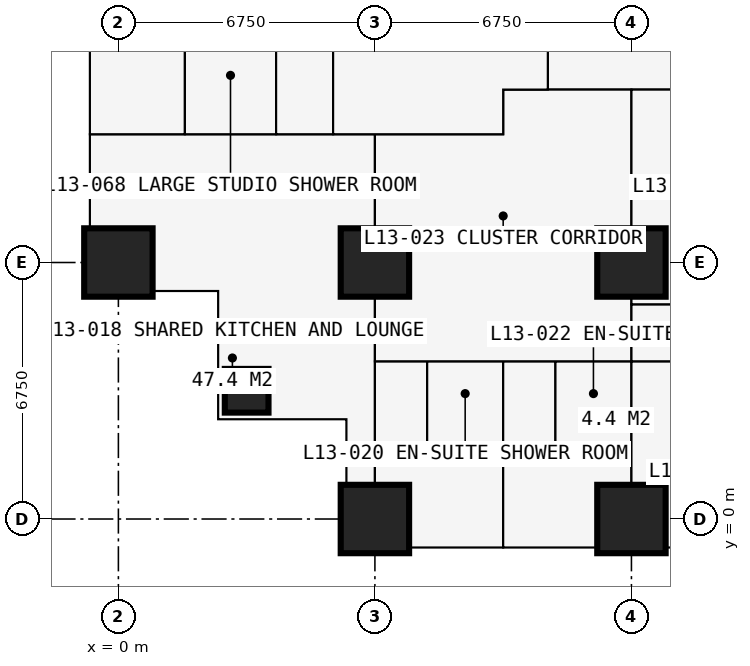
"""IFC4 building model, lengths in metres.
Left out: names, types, materials, properties, quantities, classifications, styles, units other than length and angle.
Written with IfcOpenShell. Run it as: python <this file> out.ifc"""

import sys

from ifc_helpers import new_model, si_unit, direction, frame, frame_2d, origin, origin_2d, place, context, subcontext, project, spatial, rectangle, extrude, element, fill, save


model = new_model("IFC4")
c1 = context("Model", 3, precision=1e-05, world=origin(), true_north=direction((0.0, 1.0)))
c2 = subcontext(c1, "Body", "Model", "MODEL_VIEW")
j1 = project(units=[si_unit("LENGTHUNIT", "METRE"), si_unit("PLANEANGLEUNIT", "RADIAN")], contexts=[c1])
p1 = place(None, origin())
s1 = spatial("IfcSite", under=j1, at=p1, CompositionType="ELEMENT")
p2 = place(p1, origin())
s2 = spatial("IfcBuilding", under=s1, at=p2, CompositionType="ELEMENT")
p3 = place(p2, frame((0.0, 0.0, 50.4)))
s3 = spatial("IfcBuildingStorey", under=s2, at=p3, CompositionType="ELEMENT", Elevation=50.4)
p4 = place(p3, frame((0.0, 6.75, 0.0), z_axis=(0.0, 0.0, 1.0), x_axis=(1.0, 0.0, 0.0)))
e1 = element("IfcColumn", 1, at=p4, inside=s3, PredefinedType="COLUMN", context=c2, shape_type="SweptSolid", body=[
    extrude(rectangle(XDim=1.8, YDim=1.8, at=origin_2d()), origin(), (0.0, 0.0, 1.0), 3.6),
])
p5 = place(p3, frame((3.375, 3.375, 0.0), z_axis=(0.0, 0.0, 1.0), x_axis=(1.0, 0.0, 0.0)))
e2 = element("IfcColumn", 2, at=p5, inside=s3, PredefinedType="COLUMN", context=c2, shape_type="SweptSolid", body=[
    extrude(rectangle(XDim=1.15, YDim=1.15, at=origin_2d()), origin(), (0.0, 0.0, 1.0), 3.6),
])
for number, where, z_axis, x_axis in (
    (3, (6.75, 0.0, 0.0), (0.0, 0.0, 1.0), (1.0, 0.0, 0.0)),
    (4, (6.75, 6.75, 0.0), (0.0, 0.0, 1.0), (1.0, 0.0, 0.0)),
    (5, (13.5, 0.0, 0.0), (0.0, 0.0, 1.0), (1.0, 0.0, 0.0)),
    (6, (13.5, 6.75, 0.0), (0.0, 0.0, 1.0), (1.0, 0.0, 0.0)),
):
    element("IfcColumn", number, at=place(p3, frame(where, z_axis=z_axis, x_axis=x_axis)), inside=s3, PredefinedType="COLUMN", context=c2, shape_type="SweptSolid", body=[
        extrude(rectangle(XDim=1.8, YDim=1.8, at=origin_2d()), origin(), (0.0, 0.0, 1.0), 3.6),
    ])
p6 = place(p3, frame((-0.75, 6.0, 0.0), z_axis=(0.0, 0.0, 1.0), x_axis=(1.0, 0.0, 0.0)))
e7 = element("IfcWall", 7, at=p6, inside=s3, PredefinedType="SOLIDWALL", context=c2, shape_type="SweptSolid", body=[
    extrude(rectangle(XDim=3.375, YDim=0.3, at=frame_2d((1.688, 0.0))), origin(), (0.0, 0.0, 1.0), 3.375),
])
p7 = place(p6, frame((1.833, 0.0, 0.9)))
e8 = element("IfcOpeningElement", 8, at=p7, cuts=e7, PredefinedType="OPENING", context=c2, shape_type="SweptSolid", body=[
    extrude(rectangle(XDim=1.2, YDim=1.8, at=frame_2d((0.6, 0.9))), frame((0.0, 0.16, 0.0), z_axis=(0.0, -1.0, 0.0), x_axis=(1.0, 0.0, 0.0)), (0.0, 0.0, 1.0), 0.32),
])
p8 = place(p3, frame((2.625, 6.0, 0.0), z_axis=(0.0, 0.0, 1.0), x_axis=(0.0, -1.0, 0.0)))
e9 = element("IfcWall", 9, at=p8, inside=s3, PredefinedType="SOLIDWALL", context=c2, shape_type="SweptSolid", body=[
    extrude(rectangle(XDim=3.375, YDim=0.3, at=frame_2d((1.688, 0.0))), origin(), (0.0, 0.0, 1.0), 3.375),
])
p9 = place(p8, frame((0.788, 0.0, 0.6)))
e10 = element("IfcOpeningElement", 10, at=p9, cuts=e9, PredefinedType="OPENING", context=c2, shape_type="SweptSolid", body=[
    extrude(rectangle(XDim=1.8, YDim=2.1, at=frame_2d((0.9, 1.05))), frame((0.0, 0.16, 0.0), z_axis=(0.0, -1.0, 0.0), x_axis=(1.0, 0.0, 0.0)), (0.0, 0.0, 1.0), 0.32),
])
p10 = place(p3, frame((2.625, 2.625, 0.0), z_axis=(0.0, 0.0, 1.0), x_axis=(1.0, 0.0, 0.0)))
e11 = element("IfcWall", 11, at=p10, inside=s3, PredefinedType="SOLIDWALL", context=c2, shape_type="SweptSolid", body=[
    extrude(rectangle(XDim=3.375, YDim=0.3, at=frame_2d((1.688, 0.0))), origin(), (0.0, 0.0, 1.0), 3.375),
])
p11 = place(p10, frame((0.788, 0.0, 0.6)))
e12 = element("IfcOpeningElement", 12, at=p11, cuts=e11, PredefinedType="OPENING", context=c2, shape_type="SweptSolid", body=[
    extrude(rectangle(XDim=1.8, YDim=2.1, at=frame_2d((0.9, 1.05))), frame((0.0, 0.16, 0.0), z_axis=(0.0, -1.0, 0.0), x_axis=(1.0, 0.0, 0.0)), (0.0, 0.0, 1.0), 0.32),
])
p12 = place(p3, frame((6.0, 2.625, 0.0), z_axis=(0.0, 0.0, 1.0), x_axis=(0.0, -1.0, 0.0)))
e13 = element("IfcWall", 13, at=p12, inside=s3, PredefinedType="SOLIDWALL", context=c2, shape_type="SweptSolid", body=[
    extrude(rectangle(XDim=3.375, YDim=0.3, at=frame_2d((1.688, 0.0))), origin(), (0.0, 0.0, 1.0), 3.375),
])
p13 = place(p12, frame((0.343, 0.0, 0.9)))
e14 = element("IfcOpeningElement", 14, at=p13, cuts=e13, PredefinedType="OPENING", context=c2, shape_type="SweptSolid", body=[
    extrude(rectangle(XDim=1.2, YDim=1.8, at=frame_2d((0.6, 0.9))), frame((0.0, 0.16, 0.0), z_axis=(0.0, -1.0, 0.0), x_axis=(1.0, 0.0, 0.0)), (0.0, 0.0, 1.0), 0.32),
])
p14 = place(p3, frame((-0.734, 10.125, 0.0), z_axis=(0.0, 0.0, 1.0), x_axis=(1.0, 0.0, 0.0)))
e15 = element("IfcWall", 15, at=p14, inside=s3, PredefinedType="PARTITIONING", context=c2, shape_type="SweptSolid", body=[
    extrude(rectangle(XDim=10.859, YDim=0.15, at=frame_2d((5.429, 0.0))), origin(), (0.0, 0.0, 1.0), 3.375),
])
p15 = place(p14, frame((5.134, 0.0, 0.0)))
e16 = element("IfcOpeningElement", 16, at=p15, cuts=e15, PredefinedType="OPENING", context=c2, shape_type="SweptSolid", body=[
    extrude(rectangle(XDim=1.0, YDim=2.2, at=frame_2d((0.5, 1.1))), frame((0.0, 0.085, 0.0), z_axis=(0.0, -1.0, 0.0), x_axis=(1.0, 0.0, 0.0)), (0.0, 0.0, 1.0), 0.17),
])
p16 = place(p3, frame((1.75, 10.125, 0.0), z_axis=(0.0, 0.0, 1.0), x_axis=(0.0, 1.0, 0.0)))
e17 = element("IfcWall", 17, at=p16, inside=s3, PredefinedType="PARTITIONING", context=c2, shape_type="SweptSolid", body=[
    extrude(rectangle(XDim=2.6, YDim=0.1, at=frame_2d((1.3, 0.0))), origin(), (0.0, 0.0, 1.0), 3.375),
])
p17 = place(p16, frame((0.85, 0.0, 0.0)))
e18 = element("IfcOpeningElement", 18, at=p17, cuts=e17, PredefinedType="OPENING", context=c2, shape_type="SweptSolid", body=[
    extrude(rectangle(XDim=0.9, YDim=2.2, at=frame_2d((0.45, 1.1))), frame((0.0, 0.06, 0.0), z_axis=(0.0, -1.0, 0.0), x_axis=(1.0, 0.0, 0.0)), (0.0, 0.0, 1.0), 0.12),
])
p18 = place(p3, frame((4.15, 10.125, 0.0), z_axis=(0.0, 0.0, 1.0), x_axis=(0.0, 1.0, 0.0)))
e19 = element("IfcWall", 19, at=p18, inside=s3, PredefinedType="PARTITIONING", context=c2, shape_type="SweptSolid", body=[
    extrude(rectangle(XDim=23.625, YDim=0.15, at=frame_2d((11.812, 0.0))), origin(), (0.0, 0.0, 1.0), 3.375),
])
p19 = place(p18, frame((4.2, 0.0, 0.0)))
e20 = element("IfcOpeningElement", 20, at=p19, cuts=e19, PredefinedType="OPENING", context=c2, shape_type="SweptSolid", body=[
    extrude(rectangle(XDim=0.95, YDim=2.2, at=frame_2d((0.475, 1.1))), frame((0.0, 0.085, 0.0), z_axis=(0.0, -1.0, 0.0), x_axis=(1.0, 0.0, 0.0)), (0.0, 0.0, 1.0), 0.17),
])
p20 = place(p18, frame((10.95, 0.0, 0.0)))
e21 = element("IfcOpeningElement", 21, at=p20, cuts=e19, PredefinedType="OPENING", context=c2, shape_type="SweptSolid", body=[
    extrude(rectangle(XDim=0.95, YDim=2.2, at=frame_2d((0.475, 1.1))), frame((0.0, 0.085, 0.0), z_axis=(0.0, -1.0, 0.0), x_axis=(1.0, 0.0, 0.0)), (0.0, 0.0, 1.0), 0.17),
])
p21 = place(p18, frame((17.7, 0.0, 0.0)))
e22 = element("IfcOpeningElement", 22, at=p21, cuts=e19, PredefinedType="OPENING", context=c2, shape_type="SweptSolid", body=[
    extrude(rectangle(XDim=0.95, YDim=2.2, at=frame_2d((0.475, 1.1))), frame((0.0, 0.085, 0.0), z_axis=(0.0, -1.0, 0.0), x_axis=(1.0, 0.0, 0.0)), (0.0, 0.0, 1.0), 0.17),
])
p22 = place(p18, frame((20.5, 0.0, 0.0)))
e23 = element("IfcOpeningElement", 23, at=p22, cuts=e19, PredefinedType="OPENING", context=c2, shape_type="SweptSolid", body=[
    extrude(rectangle(XDim=0.95, YDim=2.2, at=frame_2d((0.475, 1.1))), frame((0.0, 0.085, 0.0), z_axis=(0.0, -1.0, 0.0), x_axis=(1.0, 0.0, 0.0)), (0.0, 0.0, 1.0), 0.17),
])
p23 = place(p3, frame((5.65, 10.125, 0.0), z_axis=(0.0, 0.0, 1.0), x_axis=(0.0, 1.0, 0.0)))
e24 = element("IfcWall", 24, at=p23, inside=s3, PredefinedType="PARTITIONING", context=c2, shape_type="SweptSolid", body=[
    extrude(rectangle(XDim=10.762, YDim=0.15, at=frame_2d((5.381, 0.0))), origin(), (0.0, 0.0, 1.0), 3.375),
])
p24 = place(p23, frame((4.9, 0.0, 0.0)))
e25 = element("IfcOpeningElement", 25, at=p24, cuts=e24, PredefinedType="OPENING", context=c2, shape_type="SweptSolid", body=[
    extrude(rectangle(XDim=0.95, YDim=2.2, at=frame_2d((0.475, 1.1))), frame((0.0, 0.085, 0.0), z_axis=(0.0, -1.0, 0.0), x_axis=(1.0, 0.0, 0.0)), (0.0, 0.0, 1.0), 0.17),
])
p25 = place(p3, frame((6.75, -0.734, 0.0), z_axis=(0.0, 0.0, 1.0), x_axis=(0.0, 1.0, 0.0)))
e26 = element("IfcWall", 26, at=p25, inside=s3, PredefinedType="PARTITIONING", context=c2, shape_type="SweptSolid", body=[
    extrude(rectangle(XDim=10.859, YDim=0.15, at=frame_2d((5.429, 0.0))), origin(), (0.0, 0.0, 1.0), 2.877),
])
p26 = place(p3, frame((6.75, 4.15, 0.0), z_axis=(0.0, 0.0, 1.0), x_axis=(1.0, 0.0, 0.0)))
e27 = element("IfcWall", 27, at=p26, inside=s3, PredefinedType="PARTITIONING", context=c2, shape_type="SweptSolid", body=[
    extrude(rectangle(XDim=23.625, YDim=0.15, at=frame_2d((11.812, 0.0))), origin(), (0.0, 0.0, 1.0), 3.375),
])
p27 = place(p26, frame((0.2, 0.0, 0.0)))
e28 = element("IfcOpeningElement", 28, at=p27, cuts=e27, PredefinedType="OPENING", context=c2, shape_type="SweptSolid", body=[
    extrude(rectangle(XDim=0.95, YDim=2.2, at=frame_2d((0.475, 1.1))), frame((0.0, 0.085, 0.0), z_axis=(0.0, -1.0, 0.0), x_axis=(1.0, 0.0, 0.0)), (0.0, 0.0, 1.0), 0.17),
])
p28 = place(p26, frame((3.625, 0.0, 0.0)))
e29 = element("IfcOpeningElement", 29, at=p28, cuts=e27, PredefinedType="OPENING", context=c2, shape_type="SweptSolid", body=[
    extrude(rectangle(XDim=0.95, YDim=2.2, at=frame_2d((0.475, 1.1))), frame((0.0, 0.085, 0.0), z_axis=(0.0, -1.0, 0.0), x_axis=(1.0, 0.0, 0.0)), (0.0, 0.0, 1.0), 0.17),
])
p29 = place(p26, frame((18.475, 0.0, 0.0)))
e30 = element("IfcOpeningElement", 30, at=p29, cuts=e27, PredefinedType="OPENING", context=c2, shape_type="SweptSolid", body=[
    extrude(rectangle(XDim=0.95, YDim=2.2, at=frame_2d((0.475, 1.1))), frame((0.0, 0.085, 0.0), z_axis=(0.0, -1.0, 0.0), x_axis=(1.0, 0.0, 0.0)), (0.0, 0.0, 1.0), 0.17),
])
p30 = place(p26, frame((11.725, 0.0, 0.0)))
e31 = element("IfcOpeningElement", 31, at=p30, cuts=e27, PredefinedType="OPENING", context=c2, shape_type="SweptSolid", body=[
    extrude(rectangle(XDim=0.95, YDim=2.2, at=frame_2d((0.475, 1.1))), frame((0.0, 0.085, 0.0), z_axis=(0.0, -1.0, 0.0), x_axis=(1.0, 0.0, 0.0)), (0.0, 0.0, 1.0), 0.17),
])
p31 = place(p26, frame((6.95, 0.0, 0.0)))
e32 = element("IfcOpeningElement", 32, at=p31, cuts=e27, PredefinedType="OPENING", context=c2, shape_type="SweptSolid", body=[
    extrude(rectangle(XDim=0.95, YDim=2.2, at=frame_2d((0.475, 1.1))), frame((0.0, 0.085, 0.0), z_axis=(0.0, -1.0, 0.0), x_axis=(1.0, 0.0, 0.0)), (0.0, 0.0, 1.0), 0.17),
])
p32 = place(p3, frame((8.125, 1.95, 0.0), z_axis=(0.0, 0.0, 1.0), x_axis=(0.0, 1.0, 0.0)))
e33 = element("IfcWall", 33, at=p32, inside=s3, PredefinedType="PARTITIONING", context=c2, shape_type="SweptSolid", body=[
    extrude(rectangle(XDim=2.2, YDim=0.1, at=frame_2d((1.1, 0.0))), origin(), (0.0, 0.0, 1.0), 3.375),
])
p33 = place(p32, frame((0.65, 0.0, 0.0)))
e34 = element("IfcOpeningElement", 34, at=p33, cuts=e33, PredefinedType="OPENING", context=c2, shape_type="SweptSolid", body=[
    extrude(rectangle(XDim=0.9, YDim=2.2, at=frame_2d((0.45, 1.1))), frame((0.0, 0.06, 0.0), z_axis=(0.0, -1.0, 0.0), x_axis=(1.0, 0.0, 0.0)), (0.0, 0.0, 1.0), 0.12),
])
p34 = place(p3, frame((8.125, 1.95, 0.0), z_axis=(0.0, 0.0, 1.0), x_axis=(1.0, 0.0, 0.0)))
e35 = element("IfcWall", 35, at=p34, inside=s3, PredefinedType="PARTITIONING", context=c2, shape_type="SweptSolid", body=[
    extrude(rectangle(XDim=2.0, YDim=0.1, at=frame_2d((1.0, 0.0))), origin(), (0.0, 0.0, 1.0), 3.375),
])
p35 = place(p3, frame((10.125, -0.734, 0.0), z_axis=(0.0, 0.0, 1.0), x_axis=(0.0, 1.0, 0.0)))
e36 = element("IfcWall", 36, at=p35, inside=s3, PredefinedType="PARTITIONING", context=c2, shape_type="SweptSolid", body=[
    extrude(rectangle(XDim=4.884, YDim=0.175, at=frame_2d((2.442, 0.0))), origin(), (0.0, 0.0, 1.0), 3.375),
])
p36 = place(p3, frame((10.125, 10.125, 0.0), z_axis=(0.0, 0.0, 1.0), x_axis=(0.0, 1.0, 0.0)))
e37 = element("IfcWall", 37, at=p36, inside=s3, PredefinedType="PARTITIONING", context=c2, shape_type="SweptSolid", body=[
    extrude(rectangle(XDim=1.175, YDim=0.15, at=frame_2d((0.587, 0.0))), origin(), (0.0, 0.0, 1.0), 3.375),
])
p37 = place(p3, frame((10.125, 11.3, 0.0), z_axis=(0.0, 0.0, 1.0), x_axis=(1.0, 0.0, 0.0)))
e38 = element("IfcWall", 38, at=p37, inside=s3, PredefinedType="PARTITIONING", context=c2, shape_type="SweptSolid", body=[
    extrude(rectangle(XDim=20.675, YDim=0.15, at=frame_2d((10.337, 0.0))), origin(), (0.0, 0.0, 1.0), 3.375),
])
p38 = place(p37, frame((1.775, 0.0, 0.0)))
e39 = element("IfcOpeningElement", 39, at=p38, cuts=e38, PredefinedType="OPENING", context=c2, shape_type="SweptSolid", body=[
    extrude(rectangle(XDim=1.0, YDim=2.2, at=frame_2d((0.5, 1.1))), frame((0.0, 0.085, 0.0), z_axis=(0.0, -1.0, 0.0), x_axis=(1.0, 0.0, 0.0)), (0.0, 0.0, 1.0), 0.17),
])
p39 = place(p37, frame((11.312, 0.0, 0.0)))
e40 = element("IfcOpeningElement", 40, at=p39, cuts=e38, PredefinedType="OPENING", context=c2, shape_type="SweptSolid", body=[
    extrude(rectangle(XDim=1.0, YDim=2.2, at=frame_2d((0.5, 1.1))), frame((0.0, 0.085, 0.0), z_axis=(0.0, -1.0, 0.0), x_axis=(1.0, 0.0, 0.0)), (0.0, 0.0, 1.0), 0.17),
])
p40 = place(p3, frame((11.3, 11.3, 0.0), z_axis=(0.0, 0.0, 1.0), x_axis=(0.0, 1.0, 0.0)))
e41 = element("IfcWall", 41, at=p40, inside=s3, PredefinedType="PARTITIONING", context=c2, shape_type="SweptSolid", body=[
    extrude(rectangle(XDim=19.075, YDim=0.15, at=frame_2d((9.538, 0.0))), origin(), (0.0, 0.0, 1.0), 3.375),
])
p41 = place(p40, frame((10.137, 0.0, 0.0)))
e42 = element("IfcOpeningElement", 42, at=p41, cuts=e41, PredefinedType="OPENING", context=c2, shape_type="SweptSolid", body=[
    extrude(rectangle(XDim=1.0, YDim=2.2, at=frame_2d((0.5, 1.1))), frame((0.0, 0.085, 0.0), z_axis=(0.0, -1.0, 0.0), x_axis=(1.0, 0.0, 0.0)), (0.0, 0.0, 1.0), 0.17),
])
p42 = place(p3, frame((11.5, 1.95, 0.0), z_axis=(0.0, 0.0, 1.0), x_axis=(0.0, 1.0, 0.0)))
e43 = element("IfcWall", 43, at=p42, inside=s3, PredefinedType="PARTITIONING", context=c2, shape_type="SweptSolid", body=[
    extrude(rectangle(XDim=2.2, YDim=0.1, at=frame_2d((1.1, 0.0))), origin(), (0.0, 0.0, 1.0), 3.375),
])
p43 = place(p42, frame((0.65, 0.0, 0.0)))
e44 = element("IfcOpeningElement", 44, at=p43, cuts=e43, PredefinedType="OPENING", context=c2, shape_type="SweptSolid", body=[
    extrude(rectangle(XDim=0.9, YDim=2.2, at=frame_2d((0.45, 1.1))), frame((0.0, 0.06, 0.0), z_axis=(0.0, -1.0, 0.0), x_axis=(1.0, 0.0, 0.0)), (0.0, 0.0, 1.0), 0.12),
])
p44 = place(p3, frame((11.5, 1.95, 0.0), z_axis=(0.0, 0.0, 1.0), x_axis=(1.0, 0.0, 0.0)))
e45 = element("IfcWall", 45, at=p44, inside=s3, PredefinedType="PARTITIONING", context=c2, shape_type="SweptSolid", body=[
    extrude(rectangle(XDim=2.0, YDim=0.1, at=frame_2d((1.0, 0.0))), origin(), (0.0, 0.0, 1.0), 3.375),
])
p45 = place(p3, frame((13.5, -0.734, 0.0), z_axis=(0.0, 0.0, 1.0), x_axis=(0.0, 1.0, 0.0)))
e46 = element("IfcWall", 46, at=p45, inside=s3, PredefinedType="PARTITIONING", context=c2, shape_type="SweptSolid", body=[
    extrude(rectangle(XDim=12.034, YDim=0.15, at=frame_2d((6.017, 0.0))), origin(), (0.0, 0.0, 1.0), 2.61),
])
p46 = place(p3, frame((13.5, 5.65, 0.0), z_axis=(0.0, 0.0, 1.0), x_axis=(1.0, 0.0, 0.0)))
e47 = element("IfcWall", 47, at=p46, inside=s3, PredefinedType="PARTITIONING", context=c2, shape_type="SweptSolid", body=[
    extrude(rectangle(XDim=7.387, YDim=0.15, at=frame_2d((3.694, 0.0))), origin(), (0.0, 0.0, 1.0), 3.375),
])
p47 = place(p46, frame((3.2, 0.0, 0.0)))
e48 = element("IfcOpeningElement", 48, at=p47, cuts=e47, PredefinedType="OPENING", context=c2, shape_type="SweptSolid", body=[
    extrude(rectangle(XDim=0.95, YDim=2.2, at=frame_2d((0.475, 1.1))), frame((0.0, 0.085, 0.0), z_axis=(0.0, -1.0, 0.0), x_axis=(1.0, 0.0, 0.0)), (0.0, 0.0, 1.0), 0.17),
])
p48 = place(p7, origin())
e49 = element("IfcWindow", 49, at=p48, inside=s3, PartitioningType="SINGLE_PANEL", PredefinedType="WINDOW", context=c2, shape_type="SweptSolid", body=[
    extrude(rectangle(XDim=1.2, YDim=1.8, at=frame_2d((0.6, 0.9))), frame((0.0, 0.03, 0.0), z_axis=(0.0, -1.0, 0.0), x_axis=(1.0, 0.0, 0.0)), (0.0, 0.0, 1.0), 0.06),
])
fill(e8, e49)
p49 = place(p9, origin())
e50 = element("IfcWindow", 50, at=p49, inside=s3, PartitioningType="SINGLE_PANEL", PredefinedType="WINDOW", context=c2, shape_type="SweptSolid", body=[
    extrude(rectangle(XDim=1.8, YDim=2.1, at=frame_2d((0.9, 1.05))), frame((0.0, 0.03, 0.0), z_axis=(0.0, -1.0, 0.0), x_axis=(1.0, 0.0, 0.0)), (0.0, 0.0, 1.0), 0.06),
])
fill(e10, e50)
p50 = place(p11, origin())
e51 = element("IfcWindow", 51, at=p50, inside=s3, PartitioningType="SINGLE_PANEL", PredefinedType="WINDOW", context=c2, shape_type="SweptSolid", body=[
    extrude(rectangle(XDim=1.8, YDim=2.1, at=frame_2d((0.9, 1.05))), frame((0.0, 0.03, 0.0), z_axis=(0.0, -1.0, 0.0), x_axis=(1.0, 0.0, 0.0)), (0.0, 0.0, 1.0), 0.06),
])
fill(e12, e51)
p51 = place(p13, origin())
e52 = element("IfcWindow", 52, at=p51, inside=s3, PartitioningType="SINGLE_PANEL", PredefinedType="WINDOW", context=c2, shape_type="SweptSolid", body=[
    extrude(rectangle(XDim=1.2, YDim=1.8, at=frame_2d((0.6, 0.9))), frame((0.0, 0.03, 0.0), z_axis=(0.0, -1.0, 0.0), x_axis=(1.0, 0.0, 0.0)), (0.0, 0.0, 1.0), 0.06),
])
fill(e14, e52)
p52 = place(p15, origin())
e53 = element("IfcDoor", 53, at=p52, inside=s3, OperationType="SINGLE_SWING_LEFT", PredefinedType="DOOR", context=c2, shape_type="SweptSolid", body=[
    extrude(rectangle(XDim=1.0, YDim=2.2, at=frame_2d((0.5, 1.1))), frame((0.0, 0.025, 0.0), z_axis=(0.0, -1.0, 0.0), x_axis=(1.0, 0.0, 0.0)), (0.0, 0.0, 1.0), 0.05),
])
fill(e16, e53)
p53 = place(p27, origin())
e54 = element("IfcDoor", 54, at=p53, inside=s3, OperationType="SINGLE_SWING_LEFT", PredefinedType="DOOR", context=c2, shape_type="SweptSolid", body=[
    extrude(rectangle(XDim=0.95, YDim=2.2, at=frame_2d((0.475, 1.1))), frame((0.0, 0.025, 0.0), z_axis=(0.0, -1.0, 0.0), x_axis=(1.0, 0.0, 0.0)), (0.0, 0.0, 1.0), 0.05),
])
fill(e28, e54)
p54 = place(p33, origin())
e55 = element("IfcDoor", 55, at=p54, inside=s3, OperationType="SINGLE_SWING_RIGHT", PredefinedType="DOOR", context=c2, shape_type="SweptSolid", body=[
    extrude(rectangle(XDim=0.9, YDim=2.2, at=frame_2d((0.45, 1.1))), frame((0.0, 0.025, 0.0), z_axis=(0.0, -1.0, 0.0), x_axis=(1.0, 0.0, 0.0)), (0.0, 0.0, 1.0), 0.05),
])
fill(e34, e55)
p55 = place(p28, origin())
e56 = element("IfcDoor", 56, at=p55, inside=s3, OperationType="SINGLE_SWING_LEFT", PredefinedType="DOOR", context=c2, shape_type="SweptSolid", body=[
    extrude(rectangle(XDim=0.95, YDim=2.2, at=frame_2d((0.475, 1.1))), frame((0.0, 0.025, 0.0), z_axis=(0.0, -1.0, 0.0), x_axis=(1.0, 0.0, 0.0)), (0.0, 0.0, 1.0), 0.05),
])
fill(e29, e56)
p56 = place(p43, origin())
e57 = element("IfcDoor", 57, at=p56, inside=s3, OperationType="SINGLE_SWING_RIGHT", PredefinedType="DOOR", context=c2, shape_type="SweptSolid", body=[
    extrude(rectangle(XDim=0.9, YDim=2.2, at=frame_2d((0.45, 1.1))), frame((0.0, 0.025, 0.0), z_axis=(0.0, -1.0, 0.0), x_axis=(1.0, 0.0, 0.0)), (0.0, 0.0, 1.0), 0.05),
])
fill(e44, e57)
p57 = place(p38, origin())
e58 = element("IfcDoor", 58, at=p57, inside=s3, OperationType="SINGLE_SWING_LEFT", PredefinedType="DOOR", context=c2, shape_type="SweptSolid", body=[
    extrude(rectangle(XDim=1.0, YDim=2.2, at=frame_2d((0.5, 1.1))), frame((0.0, 0.025, 0.0), z_axis=(0.0, -1.0, 0.0), x_axis=(1.0, 0.0, 0.0)), (0.0, 0.0, 1.0), 0.05),
])
fill(e39, e58)
p58 = place(p31, origin())
e59 = element("IfcDoor", 59, at=p58, inside=s3, OperationType="SINGLE_SWING_LEFT", PredefinedType="DOOR", context=c2, shape_type="SweptSolid", body=[
    extrude(rectangle(XDim=0.95, YDim=2.2, at=frame_2d((0.475, 1.1))), frame((0.0, 0.025, 0.0), z_axis=(0.0, -1.0, 0.0), x_axis=(1.0, 0.0, 0.0)), (0.0, 0.0, 1.0), 0.05),
])
fill(e32, e59)
p59 = place(p17, origin())
e60 = element("IfcDoor", 60, at=p59, inside=s3, OperationType="SINGLE_SWING_RIGHT", PredefinedType="DOOR", context=c2, shape_type="SweptSolid", body=[
    extrude(rectangle(XDim=0.9, YDim=2.2, at=frame_2d((0.45, 1.1))), frame((0.0, 0.025, 0.0), z_axis=(0.0, -1.0, 0.0), x_axis=(1.0, 0.0, 0.0)), (0.0, 0.0, 1.0), 0.05),
])
fill(e18, e60)
save(model, sys.argv[1])
